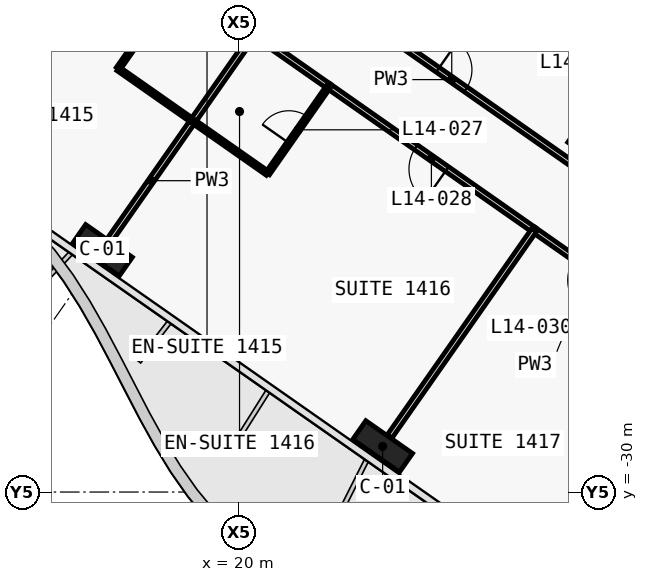
"""IFC4 building model, lengths in metres.
Left out: names, types, materials, properties, quantities, classifications, styles, units other than length and angle.
Written with IfcOpenShell. Run it as: python <this file> out.ifc"""

import sys

from ifc_helpers import new_model, si_unit, direction, frame, frame_2d, origin, origin_2d, place, context, subcontext, project, spatial, rectangle, extrude, element, fill, save


model = new_model("IFC4")
c1 = context("Model", 3, precision=1e-05, world=origin(), true_north=direction((0.0, 1.0)))
c2 = subcontext(c1, "Body", "Model", "MODEL_VIEW")
j1 = project(units=[si_unit("LENGTHUNIT", "METRE"), si_unit("PLANEANGLEUNIT", "RADIAN")], contexts=[c1])
p1 = place(None, origin())
s1 = spatial("IfcSite", under=j1, at=p1, CompositionType="ELEMENT")
p2 = place(p1, origin())
s2 = spatial("IfcBuilding", under=s1, at=p2, CompositionType="ELEMENT")
p3 = place(p2, frame((0.0, 0.0, 76.1)))
s3 = spatial("IfcBuildingStorey", under=s2, at=p3, CompositionType="ELEMENT", Elevation=76.1)
for number, where, z_axis, x_axis in (
    (1, (16.41, -23.637, 0.0), (0.0, 0.0, 1.0), (0.819, -0.574, 0.0)),
    (2, (23.782, -28.799, 0.0), (0.0, 0.0, 1.0), (0.819, -0.574, 0.0)),
):
    element("IfcColumn", number, at=place(p3, frame(where, z_axis=z_axis, x_axis=x_axis)), inside=s3, PredefinedType="COLUMN", context=c2, shape_type="SweptSolid", body=[
        extrude(rectangle(XDim=1.5, YDim=0.6, at=origin_2d()), origin(), (0.0, 0.0, 1.0), 3.6),
    ])
p4 = place(p3, frame((29.49, -20.649, 0.0), z_axis=(0.0, 0.0, 1.0), x_axis=(0.819152044289, -0.573576436351, 0.0)))
e3 = element("IfcColumn", 3, at=p4, inside=s3, PredefinedType="COLUMN", context=c2, shape_type="SweptSolid", body=[
    extrude(rectangle(XDim=1.2, YDim=1.2, at=origin_2d()), origin(), (0.0, 0.0, 1.0), 3.6),
])
p5 = place(p3, frame((22.284, -16.824, 0.0), z_axis=(0.0, 0.0, 1.0), x_axis=(0.819152599934, -0.573575642807, 0.0)))
e4 = element("IfcWall", 4, at=p5, inside=s3, PredefinedType="PARTITIONING", context=c2, shape_type="SweptSolid", body=[
    extrude(rectangle(XDim=8.098, YDim=0.15, at=frame_2d((4.049, 0.0))), origin(), (0.0, 0.0, 1.0), 2.6),
])
p6 = place(p5, frame((3.599, 0.0, 0.0)))
e5 = element("IfcOpeningElement", 5, at=p6, cuts=e4, PredefinedType="OPENING", context=c2, shape_type="SweptSolid", body=[
    extrude(rectangle(XDim=0.9, YDim=2.1, at=frame_2d((0.45, 1.05))), frame((0.0, 0.085, 0.0), z_axis=(0.0, -1.0, 0.0), x_axis=(1.0, 0.0, 0.0)), (0.0, 0.0, 1.0), 0.17),
])
p7 = place(p3, frame((27.771, -23.107, 0.0), z_axis=(0.0, 0.0, 1.0), x_axis=(-0.819153746897, 0.573574004767, 0.0)))
e6 = element("IfcWall", 6, at=p7, inside=s3, PredefinedType="PARTITIONING", context=c2, shape_type="SweptSolid", body=[
    extrude(rectangle(XDim=6.603, YDim=0.15, at=frame_2d((3.302, 0.0))), origin(), (0.0, 0.0, 1.0), 2.6),
])
p8 = place(p7, frame((2.802, 0.0, 0.0)))
e7 = element("IfcOpeningElement", 7, at=p8, cuts=e6, PredefinedType="OPENING", context=c2, shape_type="SweptSolid", body=[
    extrude(rectangle(XDim=1.0, YDim=2.1, at=frame_2d((0.5, 1.05))), frame((0.0, 0.085, 0.0), z_axis=(0.0, -1.0, 0.0), x_axis=(1.0, 0.0, 0.0)), (0.0, 0.0, 1.0), 0.17),
])
p9 = place(p3, frame((22.364, -19.322, 0.0), z_axis=(0.0, 0.0, 1.0), x_axis=(-0.819146032251, 0.573585022335, 0.0)))
e8 = element("IfcWall", 8, at=p9, inside=s3, PredefinedType="PARTITIONING", context=c2, shape_type="SweptSolid", body=[
    extrude(rectangle(XDim=2.404, YDim=0.15, at=frame_2d((1.202, 0.0))), origin(), (0.0, 0.0, 1.0), 2.6),
])
p10 = place(p3, frame((30.719, -25.172, 0.0), z_axis=(0.0, 0.0, 1.0), x_axis=(-0.819145961204, 0.573585123798, 0.0)))
e9 = element("IfcWall", 9, at=p10, inside=s3, PredefinedType="PARTITIONING", context=c2, shape_type="SweptSolid", body=[
    extrude(rectangle(XDim=3.603, YDim=0.15, at=frame_2d((1.802, 0.0))), origin(), (0.0, 0.0, 1.0), 2.6),
])
p11 = place(p10, frame((1.301, 0.0, 0.0)))
e10 = element("IfcOpeningElement", 10, at=p11, cuts=e9, PredefinedType="OPENING", context=c2, shape_type="SweptSolid", body=[
    extrude(rectangle(XDim=1.0, YDim=2.1, at=frame_2d((0.5, 1.05))), frame((0.0, 0.085, 0.0), z_axis=(0.0, -1.0, 0.0), x_axis=(1.0, 0.0, 0.0)), (0.0, 0.0, 1.0), 0.17),
])
p12 = place(p3, frame((15.481, -14.503, 0.0), z_axis=(0.0, 0.0, 1.0), x_axis=(-0.573572324301, -0.819154923562, 0.0)))
e11 = element("IfcWall", 11, at=p12, inside=s3, PredefinedType="PARTITIONING", context=c2, shape_type="SweptSolid", body=[
    extrude(rectangle(XDim=7.3, YDim=0.15, at=frame_2d((3.65, 0.0))), origin(), (0.0, 0.0, 1.0), 2.5),
])
p13 = place(p3, frame((18.43, -16.567, 0.0), z_axis=(0.0, 0.0, 1.0), x_axis=(-0.573608623498, -0.819129505664, 0.0)))
e12 = element("IfcWall", 12, at=p13, inside=s3, PredefinedType="PARTITIONING", context=c2, shape_type="SweptSolid", body=[
    extrude(rectangle(XDim=2.8, YDim=0.12, at=frame_2d((1.4, 0.0))), origin(), (0.0, 0.0, 1.0), 3.32),
])
p14 = place(p13, frame((0.975, 0.0, 0.0)))
e13 = element("IfcOpeningElement", 13, at=p14, cuts=e12, PredefinedType="OPENING", context=c2, shape_type="SweptSolid", body=[
    extrude(rectangle(XDim=0.85, YDim=2.05, at=frame_2d((0.425, 1.025))), frame((0.0, 0.07, 0.0), z_axis=(0.0, -1.0, 0.0), x_axis=(1.0, 0.0, 0.0)), (0.0, 0.0, 1.0), 0.14),
])
p15 = place(p3, frame((16.824, -18.862, 0.0), z_axis=(0.0, 0.0, 1.0), x_axis=(0.819141114317, -0.573592045652, 0.0)))
e14 = element("IfcWall", 14, at=p15, inside=s3, PredefinedType="PARTITIONING", context=c2, shape_type="SweptSolid", body=[
    extrude(rectangle(XDim=2.4, YDim=0.12, at=frame_2d((1.2, 0.0))), origin(), (0.0, 0.0, 1.0), 2.6),
])
p16 = place(p3, frame((18.79, -20.239, 0.0), z_axis=(0.0, 0.0, 1.0), x_axis=(-0.573594994199, -0.819139049631, 0.0)))
e15 = element("IfcWall", 15, at=p16, inside=s3, PredefinedType="PARTITIONING", context=c2, shape_type="SweptSolid", body=[
    extrude(rectangle(XDim=3.829, YDim=0.15, at=frame_2d((1.915, 0.0))), origin(), (0.0, 0.0, 1.0), 2.6),
])
p17 = place(p3, frame((20.396, -17.944, 0.0), z_axis=(0.0, 0.0, 1.0), x_axis=(-0.57364959175, -0.819100815459, 0.0)))
e16 = element("IfcWall", 16, at=p17, inside=s3, PredefinedType="PARTITIONING", context=c2, shape_type="SweptSolid", body=[
    extrude(rectangle(XDim=2.8, YDim=0.15, at=frame_2d((1.4, 0.0))), origin(), (0.0, 0.0, 1.0), 2.6),
])
p18 = place(p3, frame((18.79, -20.239, 0.0), z_axis=(0.0, 0.0, 1.0), x_axis=(0.819188907105, -0.573523787192, 0.0)))
e17 = element("IfcWall", 17, at=p18, inside=s3, PredefinedType="PARTITIONING", context=c2, shape_type="SweptSolid", body=[
    extrude(rectangle(XDim=2.4, YDim=0.12, at=frame_2d((1.2, 0.0))), origin(), (0.0, 0.0, 1.0), 2.6),
])
p19 = place(p3, frame((20.757, -21.615, 0.0), z_axis=(0.0, 0.0, 1.0), x_axis=(0.57364959175, 0.819100815459, 0.0)))
e18 = element("IfcWall", 18, at=p19, inside=s3, PredefinedType="PARTITIONING", context=c2, shape_type="SweptSolid", body=[
    extrude(rectangle(XDim=2.8, YDim=0.12, at=frame_2d((1.4, 0.0))), origin(), (0.0, 0.0, 1.0), 3.32),
])
p20 = place(p19, frame((0.975, 0.0, 0.0)))
e19 = element("IfcOpeningElement", 19, at=p20, cuts=e18, PredefinedType="OPENING", context=c2, shape_type="SweptSolid", body=[
    extrude(rectangle(XDim=0.85, YDim=2.05, at=frame_2d((0.425, 1.025))), frame((0.0, 0.07, 0.0), z_axis=(0.0, -1.0, 0.0), x_axis=(1.0, 0.0, 0.0)), (0.0, 0.0, 1.0), 0.14),
])
p21 = place(p3, frame((27.769, -23.106, 0.0), z_axis=(0.0, 0.0, 1.0), x_axis=(-0.57359826181, -0.819136761505, 0.0)))
e20 = element("IfcWall", 20, at=p21, inside=s3, PredefinedType="PARTITIONING", context=c2, shape_type="SweptSolid", body=[
    extrude(rectangle(XDim=6.63, YDim=0.15, at=frame_2d((3.315, 0.0))), origin(), (0.0, 0.0, 1.0), 2.6),
])
p22 = place(p20, origin())
e21 = element("IfcDoor", 21, at=p22, inside=s3, OperationType="SINGLE_SWING_LEFT", PredefinedType="DOOR", context=c2, shape_type="SweptSolid", body=[
    extrude(rectangle(XDim=0.85, YDim=2.05, at=frame_2d((0.425, 1.025))), frame((0.0, 0.025, 0.0), z_axis=(0.0, -1.0, 0.0), x_axis=(1.0, 0.0, 0.0)), (0.0, 0.0, 1.0), 0.05),
])
fill(e19, e21)
p23 = place(p8, origin())
e22 = element("IfcDoor", 22, at=p23, inside=s3, OperationType="SINGLE_SWING_LEFT", PredefinedType="DOOR", context=c2, shape_type="SweptSolid", body=[
    extrude(rectangle(XDim=1.0, YDim=2.1, at=frame_2d((0.5, 1.05))), frame((0.0, 0.025, 0.0), z_axis=(0.0, -1.0, 0.0), x_axis=(1.0, 0.0, 0.0)), (0.0, 0.0, 1.0), 0.05),
])
fill(e7, e22)
p24 = place(p6, origin())
e23 = element("IfcDoor", 23, at=p24, inside=s3, OperationType="SINGLE_SWING_RIGHT", PredefinedType="DOOR", context=c2, shape_type="SweptSolid", body=[
    extrude(rectangle(XDim=0.9, YDim=2.1, at=frame_2d((0.45, 1.05))), frame((0.0, 0.025, 0.0), z_axis=(0.0, -1.0, 0.0), x_axis=(1.0, 0.0, 0.0)), (0.0, 0.0, 1.0), 0.05),
])
fill(e5, e23)
save(model, sys.argv[1])
